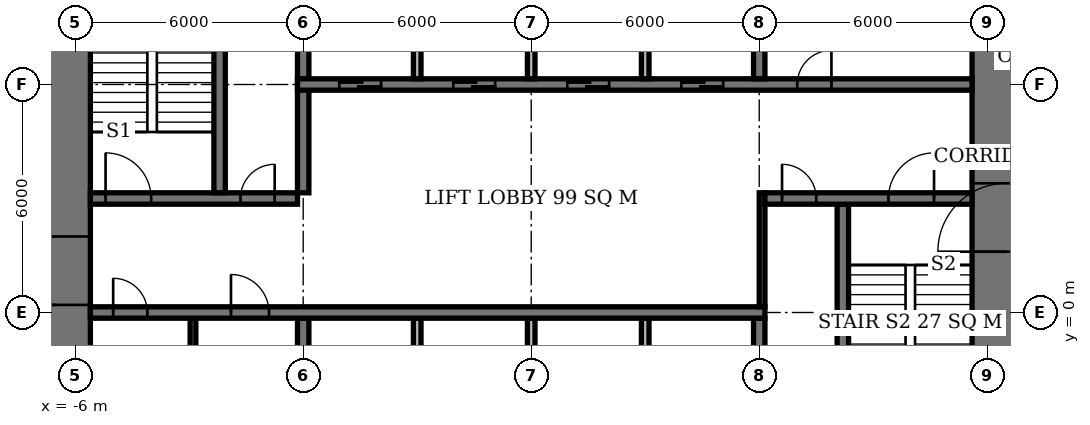
"""IFC4 building model, lengths in metres.
Left out: names, types, materials, properties, quantities, classifications, styles, units other than length and angle.
Written with IfcOpenShell. Run it as: python <this file> out.ifc"""

import sys

from ifc_helpers import new_model, si_unit, direction, frame, frame_2d, origin, place, context, subcontext, project, spatial, rectangle, extrude, element, fill, save


model = new_model("IFC4")
c1 = context("Model", 3, precision=1e-05, world=origin(), true_north=direction((0.0, 1.0)))
c2 = subcontext(c1, "Body", "Model", "MODEL_VIEW")
j1 = project(units=[si_unit("LENGTHUNIT", "METRE"), si_unit("PLANEANGLEUNIT", "RADIAN")], contexts=[c1])
p1 = place(None, origin())
s1 = spatial("IfcSite", under=j1, at=p1, CompositionType="ELEMENT")
p2 = place(p1, origin())
s2 = spatial("IfcBuilding", under=s1, at=p2, CompositionType="ELEMENT")
p3 = place(p2, frame((0.0, 0.0, 11.0)))
s3 = spatial("IfcBuildingStorey", under=s2, at=p3, CompositionType="ELEMENT", Elevation=11.0)
p4 = place(p3, frame((-6.5, -7.6, 0.0), z_axis=(0.0, 0.0, 1.0), x_axis=(0.0, 1.0, 0.0)))
e1 = element("IfcWall", 1, at=p4, inside=s3, PredefinedType="SHEAR", context=c2, shape_type="SweptSolid", body=[
    extrude(rectangle(XDim=21.2, YDim=1.8, at=frame_2d((10.6, 0.0))), origin(), (0.0, 0.0, 1.0), 7.2),
])
p5 = place(p4, frame((7.8, 0.0, 0.0)))
e2 = element("IfcOpeningElement", 2, at=p5, cuts=e1, PredefinedType="OPENING", context=c2, shape_type="SweptSolid", body=[
    extrude(rectangle(XDim=1.8, YDim=2.4, at=frame_2d((0.9, 1.2))), frame((0.0, 0.91, 0.0), z_axis=(0.0, -1.0, 0.0), x_axis=(1.0, 0.0, 0.0)), (0.0, 0.0, 1.0), 1.82),
])
p6 = place(p3, frame((18.5, -7.6, 0.0), z_axis=(0.0, 0.0, 1.0), x_axis=(0.0, 1.0, 0.0)))
e3 = element("IfcWall", 3, at=p6, inside=s3, PredefinedType="SHEAR", context=c2, shape_type="SweptSolid", body=[
    extrude(rectangle(XDim=21.2, YDim=1.8, at=frame_2d((10.6, 0.0))), origin(), (0.0, 0.0, 1.0), 7.2),
])
p7 = place(p6, frame((9.2, 0.0, 0.0)))
e4 = element("IfcOpeningElement", 4, at=p7, cuts=e3, PredefinedType="OPENING", context=c2, shape_type="SweptSolid", body=[
    extrude(rectangle(XDim=1.8, YDim=2.4, at=frame_2d((0.9, 1.2))), frame((0.0, 0.91, 0.0), z_axis=(0.0, -1.0, 0.0), x_axis=(1.0, 0.0, 0.0)), (0.0, 0.0, 1.0), 1.82),
])
p8 = place(p3, frame((-5.6, 0.0, 0.0), z_axis=(0.0, 0.0, 1.0), x_axis=(1.0, 0.0, 0.0)))
e5 = element("IfcWall", 5, at=p8, inside=s3, PredefinedType="SHEAR", context=c2, shape_type="SweptSolid", body=[
    extrude(rectangle(XDim=17.75, YDim=0.3, at=frame_2d((8.875, 0.0))), origin(), (0.0, 0.0, 1.0), 7.2),
])
p9 = place(p8, frame((0.6, 0.0, 0.0)))
e6 = element("IfcOpeningElement", 6, at=p9, cuts=e5, PredefinedType="OPENING", context=c2, shape_type="SweptSolid", body=[
    extrude(rectangle(XDim=0.9, YDim=2.1, at=frame_2d((0.45, 1.05))), frame((0.0, 0.16, 0.0), z_axis=(0.0, -1.0, 0.0), x_axis=(1.0, 0.0, 0.0)), (0.0, 0.0, 1.0), 0.32),
])
p10 = place(p8, frame((3.7, 0.0, 0.0)))
e7 = element("IfcOpeningElement", 7, at=p10, cuts=e5, PredefinedType="OPENING", context=c2, shape_type="SweptSolid", body=[
    extrude(rectangle(XDim=1.0, YDim=2.1, at=frame_2d((0.5, 1.05))), frame((0.0, 0.16, 0.0), z_axis=(0.0, -1.0, 0.0), x_axis=(1.0, 0.0, 0.0)), (0.0, 0.0, 1.0), 0.32),
])
p11 = place(p3, frame((-5.6, 3.0, 0.0), z_axis=(0.0, 0.0, 1.0), x_axis=(1.0, 0.0, 0.0)))
e8 = element("IfcWall", 8, at=p11, inside=s3, PredefinedType="SHEAR", context=c2, shape_type="SweptSolid", body=[
    extrude(rectangle(XDim=5.45, YDim=0.3, at=frame_2d((2.725, 0.0))), origin(), (0.0, 0.0, 1.0), 7.2),
])
p12 = place(p11, frame((0.4, 0.0, 0.0)))
e9 = element("IfcOpeningElement", 9, at=p12, cuts=e8, PredefinedType="OPENING", context=c2, shape_type="SweptSolid", body=[
    extrude(rectangle(XDim=1.2, YDim=2.1, at=frame_2d((0.6, 1.05))), frame((0.0, 0.16, 0.0), z_axis=(0.0, -1.0, 0.0), x_axis=(1.0, 0.0, 0.0)), (0.0, 0.0, 1.0), 0.32),
])
p13 = place(p11, frame((3.95, 0.0, 0.0)))
e10 = element("IfcOpeningElement", 10, at=p13, cuts=e8, PredefinedType="OPENING", context=c2, shape_type="SweptSolid", body=[
    extrude(rectangle(XDim=0.9, YDim=2.1, at=frame_2d((0.45, 1.05))), frame((0.0, 0.16, 0.0), z_axis=(0.0, -1.0, 0.0), x_axis=(1.0, 0.0, 0.0)), (0.0, 0.0, 1.0), 0.32),
])
p14 = place(p3, frame((12.15, 3.0, 0.0), z_axis=(0.0, 0.0, 1.0), x_axis=(1.0, 0.0, 0.0)))
e11 = element("IfcWall", 11, at=p14, inside=s3, PredefinedType="SHEAR", context=c2, shape_type="SweptSolid", body=[
    extrude(rectangle(XDim=5.45, YDim=0.3, at=frame_2d((2.725, 0.0))), origin(), (0.0, 0.0, 1.0), 7.2),
])
p15 = place(p14, frame((3.25, 0.0, 0.0)))
e12 = element("IfcOpeningElement", 12, at=p15, cuts=e11, PredefinedType="OPENING", context=c2, shape_type="SweptSolid", body=[
    extrude(rectangle(XDim=1.2, YDim=2.1, at=frame_2d((0.6, 1.05))), frame((0.0, 0.16, 0.0), z_axis=(0.0, -1.0, 0.0), x_axis=(1.0, 0.0, 0.0)), (0.0, 0.0, 1.0), 0.32),
])
p16 = place(p14, frame((0.45, 0.0, 0.0)))
e13 = element("IfcOpeningElement", 13, at=p16, cuts=e11, PredefinedType="OPENING", context=c2, shape_type="SweptSolid", body=[
    extrude(rectangle(XDim=0.9, YDim=2.1, at=frame_2d((0.45, 1.05))), frame((0.0, 0.16, 0.0), z_axis=(0.0, -1.0, 0.0), x_axis=(1.0, 0.0, 0.0)), (0.0, 0.0, 1.0), 0.32),
])
p17 = place(p3, frame((-0.15, 6.0, 0.0), z_axis=(0.0, 0.0, 1.0), x_axis=(1.0, 0.0, 0.0)))
e14 = element("IfcWall", 14, at=p17, inside=s3, PredefinedType="SHEAR", context=c2, shape_type="SweptSolid", body=[
    extrude(rectangle(XDim=17.75, YDim=0.3, at=frame_2d((8.875, 0.0))), origin(), (0.0, 0.0, 1.0), 7.2),
])
p18 = place(p17, frame((13.15, 0.0, 0.0)))
e15 = element("IfcOpeningElement", 15, at=p18, cuts=e14, PredefinedType="OPENING", context=c2, shape_type="SweptSolid", body=[
    extrude(rectangle(XDim=0.9, YDim=2.1, at=frame_2d((0.45, 1.05))), frame((0.0, 0.16, 0.0), z_axis=(0.0, -1.0, 0.0), x_axis=(1.0, 0.0, 0.0)), (0.0, 0.0, 1.0), 0.32),
])
p19 = place(p17, frame((1.1, 0.0, 0.0)))
e16 = element("IfcOpeningElement", 16, at=p19, cuts=e14, PredefinedType="OPENING", context=c2, shape_type="SweptSolid", body=[
    extrude(rectangle(XDim=1.1, YDim=2.1, at=frame_2d((0.55, 1.05))), frame((0.0, 0.16, 0.0), z_axis=(0.0, -1.0, 0.0), x_axis=(1.0, 0.0, 0.0)), (0.0, 0.0, 1.0), 0.32),
])
p20 = place(p17, frame((4.1, 0.0, 0.0)))
e17 = element("IfcOpeningElement", 17, at=p20, cuts=e14, PredefinedType="OPENING", context=c2, shape_type="SweptSolid", body=[
    extrude(rectangle(XDim=1.1, YDim=2.1, at=frame_2d((0.55, 1.05))), frame((0.0, 0.16, 0.0), z_axis=(0.0, -1.0, 0.0), x_axis=(1.0, 0.0, 0.0)), (0.0, 0.0, 1.0), 0.32),
])
p21 = place(p17, frame((7.1, 0.0, 0.0)))
e18 = element("IfcOpeningElement", 18, at=p21, cuts=e14, PredefinedType="OPENING", context=c2, shape_type="SweptSolid", body=[
    extrude(rectangle(XDim=1.1, YDim=2.1, at=frame_2d((0.55, 1.05))), frame((0.0, 0.16, 0.0), z_axis=(0.0, -1.0, 0.0), x_axis=(1.0, 0.0, 0.0)), (0.0, 0.0, 1.0), 0.32),
])
p22 = place(p17, frame((10.1, 0.0, 0.0)))
e19 = element("IfcOpeningElement", 19, at=p22, cuts=e14, PredefinedType="OPENING", context=c2, shape_type="SweptSolid", body=[
    extrude(rectangle(XDim=1.1, YDim=2.1, at=frame_2d((0.55, 1.05))), frame((0.0, 0.16, 0.0), z_axis=(0.0, -1.0, 0.0), x_axis=(1.0, 0.0, 0.0)), (0.0, 0.0, 1.0), 0.32),
])
p23 = place(p3, frame((0.0, -5.6, 0.0), z_axis=(0.0, 0.0, 1.0), x_axis=(0.0, 1.0, 0.0)))
e20 = element("IfcWall", 20, at=p23, inside=s3, PredefinedType="SHEAR", context=c2, shape_type="SweptSolid", body=[
    extrude(rectangle(XDim=5.45, YDim=0.3, at=frame_2d((2.725, 0.0))), origin(), (0.0, 0.0, 1.0), 7.2),
])
p24 = place(p3, frame((0.0, 3.15, 0.0), z_axis=(0.0, 0.0, 1.0), x_axis=(0.0, 1.0, 0.0)))
e21 = element("IfcWall", 21, at=p24, inside=s3, PredefinedType="SHEAR", context=c2, shape_type="SweptSolid", body=[
    extrude(rectangle(XDim=8.45, YDim=0.3, at=frame_2d((4.225, 0.0))), origin(), (0.0, 0.0, 1.0), 7.2),
])
for number, where, z_axis, x_axis in (
    (22, (12.0, -5.6, 0.0), (0.0, 0.0, 1.0), (0.0, 1.0, 0.0)),
    (23, (12.0, 6.15, 0.0), (0.0, 0.0, 1.0), (0.0, 1.0, 0.0)),
):
    element("IfcWall", number, at=place(p3, frame(where, z_axis=z_axis, x_axis=x_axis)), inside=s3, PredefinedType="SHEAR", context=c2, shape_type="SweptSolid", body=[
        extrude(rectangle(XDim=5.45, YDim=0.3, at=frame_2d((2.725, 0.0))), origin(), (0.0, 0.0, 1.0), 7.2),
    ])
for number, where, z_axis, x_axis in (
    (24, (-2.2, 3.15, 0.0), (0.0, 0.0, 1.0), (0.0, 1.0, 0.0)),
    (25, (14.2, -5.6, 0.0), (0.0, 0.0, 1.0), (0.0, 1.0, 0.0)),
):
    element("IfcWall", number, at=place(p3, frame(where, z_axis=z_axis, x_axis=x_axis)), inside=s3, PredefinedType="SHEAR", context=c2, shape_type="SweptSolid", body=[
        extrude(rectangle(XDim=8.45, YDim=0.3, at=frame_2d((4.225, 0.0))), origin(), (0.0, 0.0, 1.0), 7.2),
    ])
for number, where, z_axis, x_axis in (
    (26, (3.0, 6.15, 0.0), (0.0, 0.0, 1.0), (0.0, 1.0, 0.0)),
    (27, (6.0, 6.15, 0.0), (0.0, 0.0, 1.0), (0.0, 1.0, 0.0)),
    (28, (9.0, 6.15, 0.0), (0.0, 0.0, 1.0), (0.0, 1.0, 0.0)),
    (29, (3.0, -5.6, 0.0), (0.0, 0.0, 1.0), (0.0, 1.0, 0.0)),
    (30, (6.0, -5.6, 0.0), (0.0, 0.0, 1.0), (0.0, 1.0, 0.0)),
    (31, (9.0, -5.6, 0.0), (0.0, 0.0, 1.0), (0.0, 1.0, 0.0)),
):
    element("IfcWall", number, at=place(p3, frame(where, z_axis=z_axis, x_axis=x_axis)), inside=s3, PredefinedType="SOLIDWALL", context=c2, shape_type="SweptSolid", body=[
        extrude(rectangle(XDim=5.45, YDim=0.2, at=frame_2d((2.725, 0.0))), origin(), (0.0, 0.0, 1.0), 7.2),
    ])
p25 = place(p3, frame((-2.9, -5.6, 0.0), z_axis=(0.0, 0.0, 1.0), x_axis=(0.0, 1.0, 0.0)))
e32 = element("IfcWall", 32, at=p25, inside=s3, PredefinedType="PLUMBINGWALL", context=c2, shape_type="SweptSolid", body=[
    extrude(rectangle(XDim=5.45, YDim=0.15, at=frame_2d((2.725, 0.0))), origin(), (0.0, 0.0, 1.0), 6.95),
])
p26 = place(p3, frame((12.075, 0.15, 0.0), z_axis=(0.0, 0.0, 1.0), x_axis=(0.0, 1.0, 0.0)))
e33 = element("IfcWall", 33, at=p26, inside=s3, PredefinedType="PARTITIONING", context=c2, shape_type="SweptSolid", body=[
    extrude(rectangle(XDim=3.0, YDim=0.15, at=frame_2d((1.5, 0.0))), origin(), (0.0, 0.0, 1.0), 6.95),
])
p27 = place(p5, origin())
e34 = element("IfcDoor", 34, at=p27, inside=s3, OperationType="DOUBLE_DOOR_SINGLE_SWING", PredefinedType="DOOR", context=c2, shape_type="SweptSolid", body=[
    extrude(rectangle(XDim=1.8, YDim=2.4, at=frame_2d((0.9, 1.2))), frame((0.0, 0.025, 0.0), z_axis=(0.0, -1.0, 0.0), x_axis=(1.0, 0.0, 0.0)), (0.0, 0.0, 1.0), 0.05),
])
fill(e2, e34)
p28 = place(p7, origin())
e35 = element("IfcDoor", 35, at=p28, inside=s3, OperationType="DOUBLE_DOOR_SINGLE_SWING", PredefinedType="DOOR", context=c2, shape_type="SweptSolid", body=[
    extrude(rectangle(XDim=1.8, YDim=2.4, at=frame_2d((0.9, 1.2))), frame((0.0, 0.025, 0.0), z_axis=(0.0, -1.0, 0.0), x_axis=(1.0, 0.0, 0.0)), (0.0, 0.0, 1.0), 0.05),
])
fill(e4, e35)
p29 = place(p12, origin())
e36 = element("IfcDoor", 36, at=p29, inside=s3, OperationType="SINGLE_SWING_LEFT", PredefinedType="DOOR", context=c2, shape_type="SweptSolid", body=[
    extrude(rectangle(XDim=1.2, YDim=2.1, at=frame_2d((0.6, 1.05))), frame((0.0, 0.025, 0.0), z_axis=(0.0, -1.0, 0.0), x_axis=(1.0, 0.0, 0.0)), (0.0, 0.0, 1.0), 0.05),
])
fill(e9, e36)
p30 = place(p13, origin())
e37 = element("IfcDoor", 37, at=p30, inside=s3, OperationType="SINGLE_SWING_RIGHT", PredefinedType="DOOR", context=c2, shape_type="SweptSolid", body=[
    extrude(rectangle(XDim=0.9, YDim=2.1, at=frame_2d((0.45, 1.05))), frame((0.0, 0.025, 0.0), z_axis=(0.0, -1.0, 0.0), x_axis=(1.0, 0.0, 0.0)), (0.0, 0.0, 1.0), 0.05),
])
fill(e10, e37)
p31 = place(p15, origin())
e38 = element("IfcDoor", 38, at=p31, inside=s3, OperationType="SINGLE_SWING_RIGHT", PredefinedType="DOOR", context=c2, shape_type="SweptSolid", body=[
    extrude(rectangle(XDim=1.2, YDim=2.1, at=frame_2d((0.6, 1.05))), frame((0.0, 0.025, 0.0), z_axis=(0.0, -1.0, 0.0), x_axis=(1.0, 0.0, 0.0)), (0.0, 0.0, 1.0), 0.05),
])
fill(e12, e38)
p32 = place(p16, origin())
e39 = element("IfcDoor", 39, at=p32, inside=s3, OperationType="SINGLE_SWING_LEFT", PredefinedType="DOOR", context=c2, shape_type="SweptSolid", body=[
    extrude(rectangle(XDim=0.9, YDim=2.1, at=frame_2d((0.45, 1.05))), frame((0.0, 0.025, 0.0), z_axis=(0.0, -1.0, 0.0), x_axis=(1.0, 0.0, 0.0)), (0.0, 0.0, 1.0), 0.05),
])
fill(e13, e39)
p33 = place(p9, origin())
e40 = element("IfcDoor", 40, at=p33, inside=s3, OperationType="SINGLE_SWING_LEFT", PredefinedType="DOOR", context=c2, shape_type="SweptSolid", body=[
    extrude(rectangle(XDim=0.9, YDim=2.1, at=frame_2d((0.45, 1.05))), frame((0.0, 0.025, 0.0), z_axis=(0.0, -1.0, 0.0), x_axis=(1.0, 0.0, 0.0)), (0.0, 0.0, 1.0), 0.05),
])
fill(e6, e40)
p34 = place(p10, origin())
e41 = element("IfcDoor", 41, at=p34, inside=s3, OperationType="SINGLE_SWING_LEFT", PredefinedType="DOOR", context=c2, shape_type="SweptSolid", body=[
    extrude(rectangle(XDim=1.0, YDim=2.1, at=frame_2d((0.5, 1.05))), frame((0.0, 0.025, 0.0), z_axis=(0.0, -1.0, 0.0), x_axis=(1.0, 0.0, 0.0)), (0.0, 0.0, 1.0), 0.05),
])
fill(e7, e41)
p35 = place(p18, origin())
e42 = element("IfcDoor", 42, at=p35, inside=s3, OperationType="SINGLE_SWING_RIGHT", PredefinedType="DOOR", context=c2, shape_type="SweptSolid", body=[
    extrude(rectangle(XDim=0.9, YDim=2.1, at=frame_2d((0.45, 1.05))), frame((0.0, 0.025, 0.0), z_axis=(0.0, -1.0, 0.0), x_axis=(1.0, 0.0, 0.0)), (0.0, 0.0, 1.0), 0.05),
])
fill(e15, e42)
p36 = place(p19, origin())
e43 = element("IfcDoor", 43, at=p36, inside=s3, OperationType="DOUBLE_DOOR_SLIDING", PredefinedType="USERDEFINED", context=c2, shape_type="SweptSolid", body=[
    extrude(rectangle(XDim=1.1, YDim=2.1, at=frame_2d((0.55, 1.05))), frame((0.0, 0.025, 0.0), z_axis=(0.0, -1.0, 0.0), x_axis=(1.0, 0.0, 0.0)), (0.0, 0.0, 1.0), 0.05),
])
fill(e16, e43)
p37 = place(p20, origin())
e44 = element("IfcDoor", 44, at=p37, inside=s3, OperationType="DOUBLE_DOOR_SLIDING", PredefinedType="USERDEFINED", context=c2, shape_type="SweptSolid", body=[
    extrude(rectangle(XDim=1.1, YDim=2.1, at=frame_2d((0.55, 1.05))), frame((0.0, 0.025, 0.0), z_axis=(0.0, -1.0, 0.0), x_axis=(1.0, 0.0, 0.0)), (0.0, 0.0, 1.0), 0.05),
])
fill(e17, e44)
p38 = place(p21, origin())
e45 = element("IfcDoor", 45, at=p38, inside=s3, OperationType="DOUBLE_DOOR_SLIDING", PredefinedType="USERDEFINED", context=c2, shape_type="SweptSolid", body=[
    extrude(rectangle(XDim=1.1, YDim=2.1, at=frame_2d((0.55, 1.05))), frame((0.0, 0.025, 0.0), z_axis=(0.0, -1.0, 0.0), x_axis=(1.0, 0.0, 0.0)), (0.0, 0.0, 1.0), 0.05),
])
fill(e18, e45)
p39 = place(p22, origin())
e46 = element("IfcDoor", 46, at=p39, inside=s3, OperationType="DOUBLE_DOOR_SLIDING", PredefinedType="USERDEFINED", context=c2, shape_type="SweptSolid", body=[
    extrude(rectangle(XDim=1.1, YDim=2.1, at=frame_2d((0.55, 1.05))), frame((0.0, 0.025, 0.0), z_axis=(0.0, -1.0, 0.0), x_axis=(1.0, 0.0, 0.0)), (0.0, 0.0, 1.0), 0.05),
])
fill(e19, e46)
save(model, sys.argv[1])
